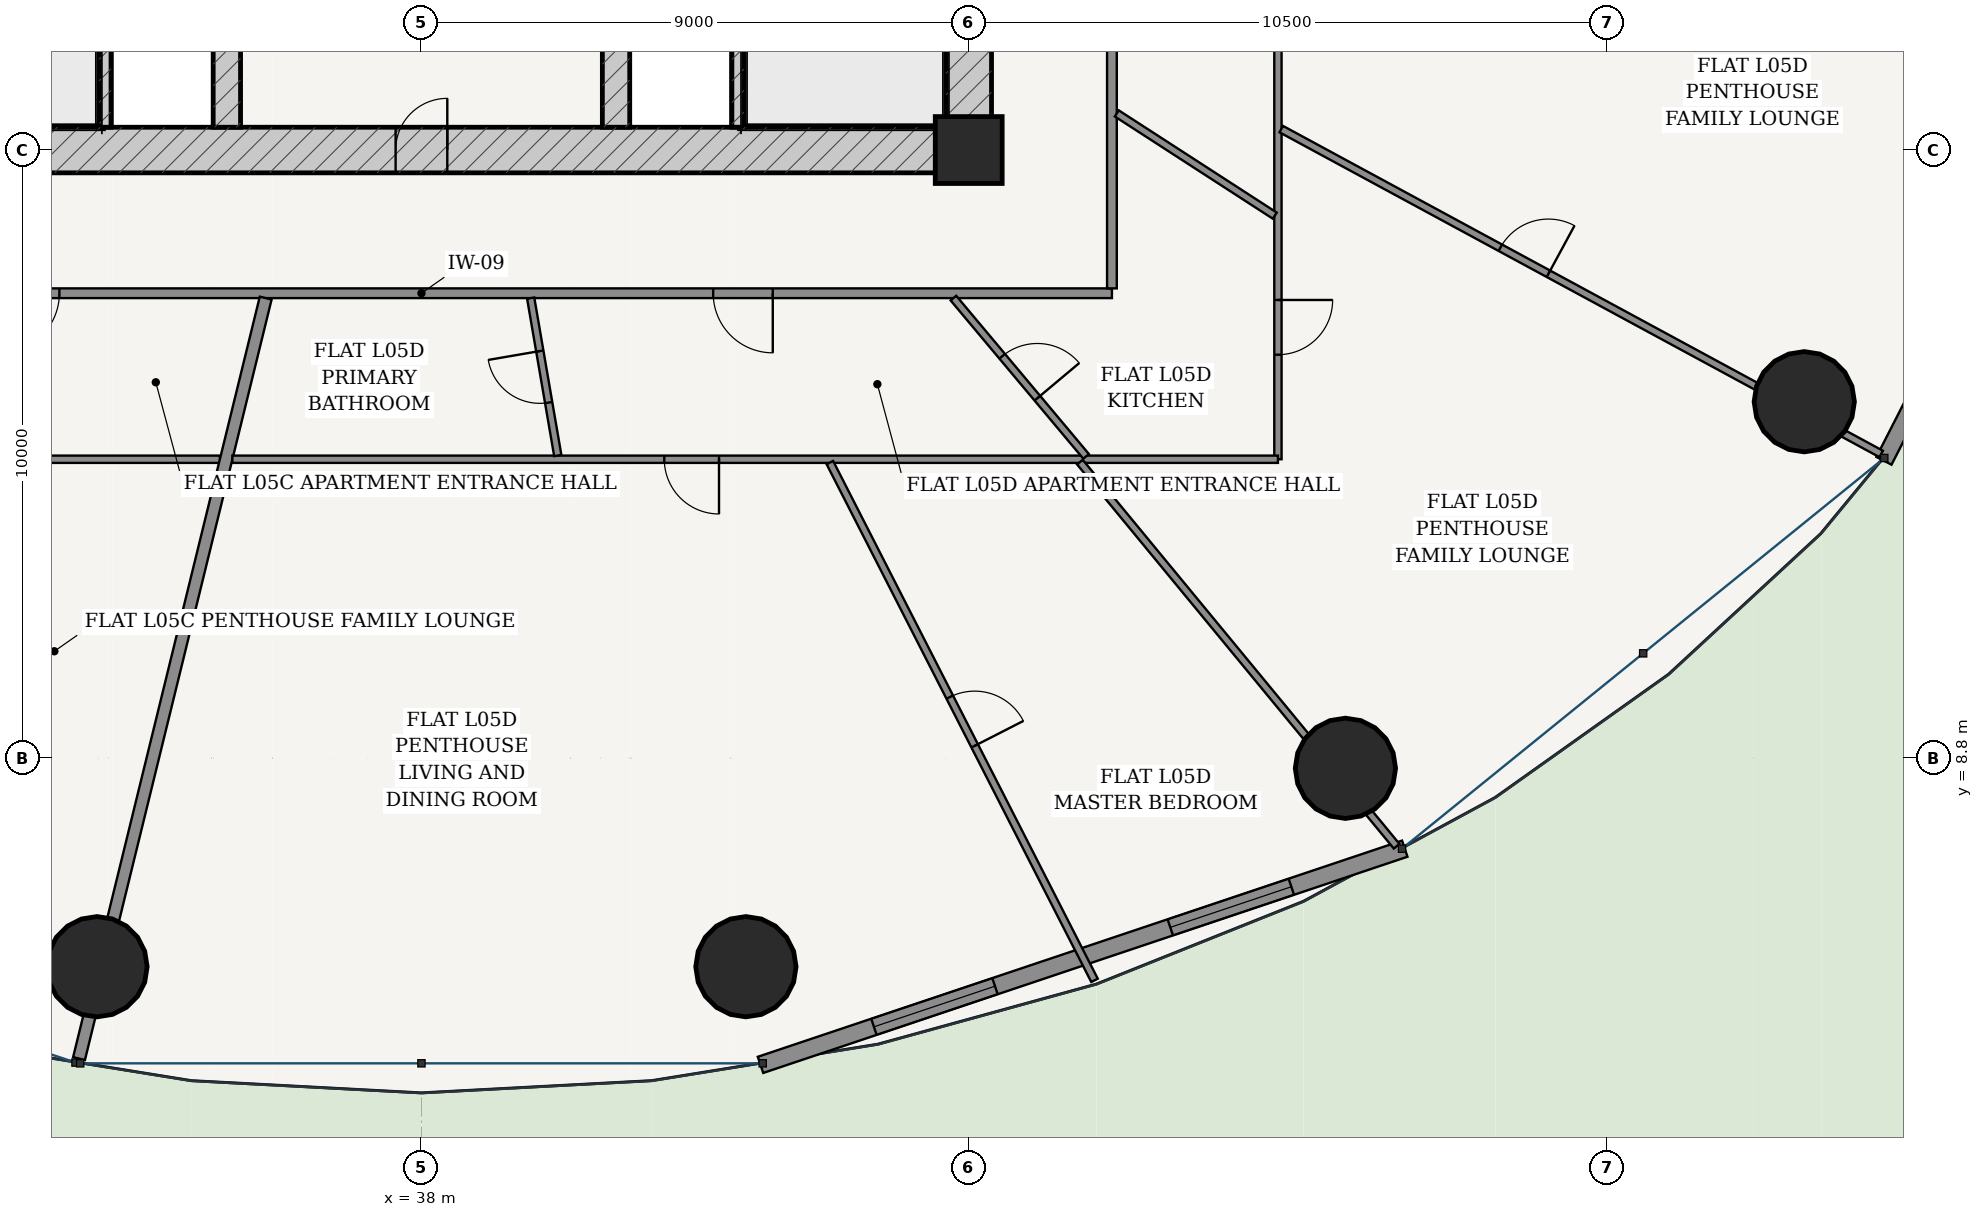
"""IFC4 building model, lengths in metres.
Left out: names, types, materials, properties, quantities, classifications, styles, units other than length and angle.
Written with IfcOpenShell. Run it as: python <this file> out.ifc"""

import sys

from ifc_helpers import new_model, si_unit, direction, frame, frame_2d, origin, origin_2d, place, context, subcontext, project, spatial, rectangle, hollow_circle, extrude, source, transform, mapped, element, fill, save


model = new_model("IFC4")
c1 = context("Model", 3, precision=1e-05, world=origin(), true_north=direction((-0.2419218956, 0.970295726276)))
c2 = subcontext(c1, "Body", "Model", "MODEL_VIEW")
j1 = project(units=[si_unit("LENGTHUNIT", "METRE"), si_unit("PLANEANGLEUNIT", "RADIAN")], contexts=[c1])
p1 = place(None, origin())
s1 = spatial("IfcSite", under=j1, at=p1, CompositionType="ELEMENT")
p2 = place(p1, origin())
s2 = spatial("IfcBuilding", under=s1, at=p2, CompositionType="ELEMENT")
p3 = place(p2, frame((0.0, 0.0, 24.0)))
s3 = spatial("IfcBuildingStorey", under=s2, at=p3, CompositionType="ELEMENT", Elevation=24.0)
p4 = place(p3, frame((47.0, 18.8, 0.0), z_axis=(0.0, 0.0, 1.0), x_axis=(1.0, 0.0, 0.0)))
e1 = element("IfcColumn", 1, at=p4, inside=s3, PredefinedType="COLUMN", context=c2, shape_type="SweptSolid", body=[
    extrude(rectangle(XDim=1.1, YDim=1.1, at=origin_2d()), origin(), (0.0, 0.0, 1.0), 3.6),
])
p5 = place(p3, frame((28.625, 18.8, 0.0), z_axis=(0.0, 0.0, 1.0), x_axis=(1.0, 0.0, 0.0)))
e2 = element("IfcWall", 2, at=p5, inside=s3, PredefinedType="SHEAR", context=c2, shape_type="SweptSolid", body=[
    extrude(rectangle(XDim=18.75, YDim=0.75, at=frame_2d((9.375, 0.0))), origin(), (0.0, 0.0, 1.0), 3.32),
])
p6 = place(p5, frame((8.95, 0.0, 0.0)))
e3 = element("IfcOpeningElement", 3, at=p6, cuts=e2, PredefinedType="OPENING", context=c2, shape_type="SweptSolid", body=[
    extrude(rectangle(XDim=0.85, YDim=2.1, at=frame_2d((0.425, 1.05))), frame((0.0, 0.385, 0.0), z_axis=(0.0, -1.0, 0.0), x_axis=(1.0, 0.0, 0.0)), (0.0, 0.0, 1.0), 0.77),
])
p7 = place(p3, frame((47.0, 19.175, 0.0), z_axis=(0.0, 0.0, 1.0), x_axis=(0.0, 1.0, 0.0)))
e4 = element("IfcWall", 4, at=p7, inside=s3, PredefinedType="SHEAR", context=c2, shape_type="SweptSolid", body=[
    extrude(rectangle(XDim=15.25, YDim=0.75, at=frame_2d((7.625, 0.0))), origin(), (0.0, 0.0, 1.0), 3.32),
])
p8 = place(p7, frame((9.875, 0.0, 0.0)))
e5 = element("IfcOpeningElement", 5, at=p8, cuts=e4, PredefinedType="OPENING", context=c2, shape_type="SweptSolid", body=[
    extrude(rectangle(XDim=1.5, YDim=2.2, at=frame_2d((0.75, 1.1))), frame((0.0, 0.385, 0.0), z_axis=(0.0, -1.0, 0.0), x_axis=(1.0, 0.0, 0.0)), (0.0, 0.0, 1.0), 0.77),
])
for number, where, z_axis, x_axis in (
    (6, (32.795, 19.175, 0.0), (0.0, 0.0, 1.0), (0.0, 1.0, 0.0)),
    (7, (43.205, 19.175, 0.0), (0.0, 0.0, 1.0), (0.0, 1.0, 0.0)),
):
    element("IfcWall", number, at=place(p3, frame(where, z_axis=z_axis, x_axis=x_axis)), inside=s3, PredefinedType="SOLIDWALL", context=c2, shape_type="SweptSolid", body=[
        extrude(rectangle(XDim=7.375, YDim=0.2, at=frame_2d((3.688, 0.0))), origin(), (0.0, 0.0, 1.0), 3.32),
    ])
p9 = place(p3, frame((34.8, 19.175, 0.0), z_axis=(0.0, 0.0, 1.0), x_axis=(0.0, 1.0, 0.0)))
e8 = element("IfcWall", 8, at=p9, inside=s3, PredefinedType="SHEAR", context=c2, shape_type="SweptSolid", body=[
    extrude(rectangle(XDim=15.25, YDim=0.45, at=frame_2d((7.625, 0.0))), origin(), (0.0, 0.0, 1.0), 3.32),
])
p10 = place(p9, frame((7.8, 0.0, 0.0)))
e9 = element("IfcOpeningElement", 9, at=p10, cuts=e8, PredefinedType="OPENING", context=c2, shape_type="SweptSolid", body=[
    extrude(rectangle(XDim=1.05, YDim=2.15, at=frame_2d((0.525, 1.075))), frame((0.0, 0.235, 0.0), z_axis=(0.0, -1.0, 0.0), x_axis=(1.0, 0.0, 0.0)), (0.0, 0.0, 1.0), 0.47),
])
p11 = place(p3, frame((41.2, 19.175, 0.0), z_axis=(0.0, 0.0, 1.0), x_axis=(0.0, 1.0, 0.0)))
e10 = element("IfcWall", 10, at=p11, inside=s3, PredefinedType="SHEAR", context=c2, shape_type="SweptSolid", body=[
    extrude(rectangle(XDim=15.25, YDim=0.45, at=frame_2d((7.625, 0.0))), origin(), (0.0, 0.0, 1.0), 3.32),
])
p12 = place(p11, frame((7.8, 0.0, 0.0)))
e11 = element("IfcOpeningElement", 11, at=p12, cuts=e10, PredefinedType="OPENING", context=c2, shape_type="SweptSolid", body=[
    extrude(rectangle(XDim=1.05, YDim=2.15, at=frame_2d((0.525, 1.075))), frame((0.0, 0.235, 0.0), z_axis=(0.0, -1.0, 0.0), x_axis=(1.0, 0.0, 0.0)), (0.0, 0.0, 1.0), 0.47),
])
for number, where, z_axis, x_axis in (
    (12, (32.664, 5.37, 0.0), (0.0, 0.0, 1.0), (1.0, 0.0, 0.0)),
    (13, (43.336, 5.37, 0.0), (0.0, 0.0, 1.0), (1.0, 0.0, 0.0)),
    (14, (53.195, 8.632, 0.0), (0.0, 0.0, 1.0), (1.0, 0.0, 0.0)),
    (15, (60.741, 14.661, 0.0), (0.0, 0.0, 1.0), (1.0, 0.0, 0.0)),
):
    element("IfcColumn", number, at=place(p3, frame(where, z_axis=z_axis, x_axis=x_axis)), inside=s3, PredefinedType="COLUMN", context=c2, shape_type="SweptSolid", body=[
        extrude(hollow_circle(Radius=0.825, WallThickness=0.05, at=origin_2d()), origin(), (0.0, 0.0, 1.0), 3.6),
    ])
p13 = place(p3, frame((43.576, 3.756, 0.0), z_axis=(0.0, 0.0, 1.0), x_axis=(0.948047847546, 0.31812777113, 0.0)))
e16 = element("IfcWall", 16, at=p13, inside=s3, PredefinedType="SOLIDWALL", context=c2, shape_type="SweptSolid", body=[
    extrude(rectangle(XDim=11.175, YDim=0.28, at=frame_2d((5.588, 0.0))), origin(), (0.0, 0.0, 1.0), 3.32),
])
p14 = place(p13, frame((1.967, 0.0, 0.85)))
e17 = element("IfcOpeningElement", 17, at=p14, cuts=e16, PredefinedType="OPENING", context=c2, shape_type="SweptSolid", body=[
    extrude(rectangle(XDim=2.1, YDim=1.95, at=frame_2d((1.05, 0.975))), frame((0.0, 0.15, 0.0), z_axis=(0.0, -1.0, 0.0), x_axis=(1.0, 0.0, 0.0)), (0.0, 0.0, 1.0), 0.3),
])
p15 = place(p13, frame((7.108, 0.0, 0.85)))
e18 = element("IfcOpeningElement", 18, at=p15, cuts=e16, PredefinedType="OPENING", context=c2, shape_type="SweptSolid", body=[
    extrude(rectangle(XDim=2.1, YDim=1.95, at=frame_2d((1.05, 0.975))), frame((0.0, 0.15, 0.0), z_axis=(0.0, -1.0, 0.0), x_axis=(1.0, 0.0, 0.0)), (0.0, 0.0, 1.0), 0.3),
])
p16 = place(p3, frame((62.051, 13.689, 0.0), z_axis=(0.0, 0.0, 1.0), x_axis=(0.455220575541, 0.890378698984, 0.0)))
e19 = element("IfcWall", 19, at=p16, inside=s3, PredefinedType="SOLIDWALL", context=c2, shape_type="SweptSolid", body=[
    extrude(rectangle(XDim=9.662, YDim=0.28, at=frame_2d((4.831, 0.0))), origin(), (0.0, 0.0, 1.0), 3.32),
])
p17 = place(p16, frame((4.156, 0.0, 0.0)))
e20 = element("IfcOpeningElement", 20, at=p17, cuts=e19, PredefinedType="OPENING", context=c2, shape_type="SweptSolid", body=[
    extrude(rectangle(XDim=1.35, YDim=2.2, at=frame_2d((0.675, 1.1))), frame((0.0, 0.15, 0.0), z_axis=(0.0, -1.0, 0.0), x_axis=(1.0, 0.0, 0.0)), (0.0, 0.0, 1.0), 0.3),
])
p18 = place(p3, frame((26.645, 16.445, 0.0), z_axis=(0.0, 0.0, 1.0), x_axis=(1.0, 0.0, 0.0)))
e21 = element("IfcWall", 21, at=p18, inside=s3, PredefinedType="PARTITIONING", context=c2, shape_type="SweptSolid", body=[
    extrude(rectangle(XDim=22.71, YDim=0.16, at=frame_2d((11.355, 0.0))), origin(), (0.0, 0.0, 1.0), 2.688),
])
p19 = place(p18, frame((4.421, 0.0, 0.0)))
e22 = element("IfcOpeningElement", 22, at=p19, cuts=e21, PredefinedType="OPENING", context=c2, shape_type="SweptSolid", body=[
    extrude(rectangle(XDim=0.98, YDim=2.2, at=frame_2d((0.49, 1.1))), frame((0.0, 0.09, 0.0), z_axis=(0.0, -1.0, 0.0), x_axis=(1.0, 0.0, 0.0)), (0.0, 0.0, 1.0), 0.18),
])
p20 = place(p18, frame((16.153, 0.0, 0.0)))
e23 = element("IfcOpeningElement", 23, at=p20, cuts=e21, PredefinedType="OPENING", context=c2, shape_type="SweptSolid", body=[
    extrude(rectangle(XDim=0.98, YDim=2.2, at=frame_2d((0.49, 1.1))), frame((0.0, 0.09, 0.0), z_axis=(0.0, -1.0, 0.0), x_axis=(1.0, 0.0, 0.0)), (0.0, 0.0, 1.0), 0.18),
])
p21 = place(p3, frame((49.355, 16.525, 0.0), z_axis=(0.0, 0.0, 1.0), x_axis=(0.0, 1.0, 0.0)))
e24 = element("IfcWall", 24, at=p21, inside=s3, PredefinedType="PARTITIONING", context=c2, shape_type="SweptSolid", body=[
    extrude(rectangle(XDim=20.55, YDim=0.16, at=frame_2d((10.275, 0.0))), origin(), (0.0, 0.0, 1.0), 2.688),
])
p22 = place(p21, frame((15.635, 0.0, 0.0)))
e25 = element("IfcOpeningElement", 25, at=p22, cuts=e24, PredefinedType="OPENING", context=c2, shape_type="SweptSolid", body=[
    extrude(rectangle(XDim=0.98, YDim=2.2, at=frame_2d((0.49, 1.1))), frame((0.0, 0.09, 0.0), z_axis=(0.0, -1.0, 0.0), x_axis=(1.0, 0.0, 0.0)), (0.0, 0.0, 1.0), 0.18),
])
p23 = place(p3, frame((34.686, 13.715, 0.0), z_axis=(0.0, 0.0, 1.0), x_axis=(-1.0, 0.0, 0.0)))
e26 = element("IfcWall", 26, at=p23, inside=s3, PredefinedType="PARTITIONING", context=c2, shape_type="SweptSolid", body=[
    extrude(rectangle(XDim=10.771, YDim=0.12, at=frame_2d((5.385, 0.0))), origin(), (0.0, 0.0, 1.0), 2.688),
])
p24 = place(p23, frame((5.01, 0.0, 0.0)))
e27 = element("IfcOpeningElement", 27, at=p24, cuts=e26, PredefinedType="OPENING", context=c2, shape_type="SweptSolid", body=[
    extrude(rectangle(XDim=0.9, YDim=2.15, at=frame_2d((0.45, 1.075))), frame((0.0, 0.07, 0.0), z_axis=(0.0, -1.0, 0.0), x_axis=(1.0, 0.0, 0.0)), (0.0, 0.0, 1.0), 0.14),
])
p25 = place(p3, frame((35.438, 16.365, 0.0), z_axis=(0.0, 0.0, 1.0), x_axis=(-0.238380116209, -0.971171931326, 0.0)))
e28 = element("IfcWall", 28, at=p25, inside=s3, PredefinedType="PARTITIONING", context=c2, shape_type="SweptSolid", body=[
    extrude(rectangle(XDim=12.877, YDim=0.2, at=frame_2d((6.438, 0.0))), origin(), (0.0, 0.0, 1.0), 2.688),
])
p26 = place(p3, frame((52.085, 24.428, 0.0), z_axis=(0.0, 0.0, 1.0), x_axis=(0.0, -1.0, 0.0)))
e29 = element("IfcWall", 29, at=p26, inside=s3, PredefinedType="PARTITIONING", context=c2, shape_type="SweptSolid", body=[
    extrude(rectangle(XDim=10.713, YDim=0.12, at=frame_2d((5.356, 0.0))), origin(), (0.0, 0.0, 1.0), 2.688),
])
p27 = place(p26, frame((8.094, 0.0, 0.0)))
e30 = element("IfcOpeningElement", 30, at=p27, cuts=e29, PredefinedType="OPENING", context=c2, shape_type="SweptSolid", body=[
    extrude(rectangle(XDim=0.9, YDim=2.15, at=frame_2d((0.45, 1.075))), frame((0.0, 0.07, 0.0), z_axis=(0.0, -1.0, 0.0), x_axis=(1.0, 0.0, 0.0)), (0.0, 0.0, 1.0), 0.14),
])
p28 = place(p26, frame((2.354, 0.0, 0.0)))
e31 = element("IfcOpeningElement", 31, at=p28, cuts=e29, PredefinedType="OPENING", context=c2, shape_type="SweptSolid", body=[
    extrude(rectangle(XDim=0.9, YDim=2.15, at=frame_2d((0.45, 1.075))), frame((0.0, 0.07, 0.0), z_axis=(0.0, -1.0, 0.0), x_axis=(1.0, 0.0, 0.0)), (0.0, 0.0, 1.0), 0.14),
])
p29 = place(p3, frame((52.085, 13.715, 0.0), z_axis=(0.0, 0.0, 1.0), x_axis=(-1.0, 0.0, 0.0)))
e32 = element("IfcWall", 32, at=p29, inside=s3, PredefinedType="PARTITIONING", context=c2, shape_type="SweptSolid", body=[
    extrude(rectangle(XDim=17.195, YDim=0.12, at=frame_2d((8.597, 0.0))), origin(), (0.0, 0.0, 1.0), 2.688),
])
p30 = place(p29, frame((9.191, 0.0, 0.0)))
e33 = element("IfcOpeningElement", 33, at=p30, cuts=e32, PredefinedType="OPENING", context=c2, shape_type="SweptSolid", body=[
    extrude(rectangle(XDim=0.9, YDim=2.15, at=frame_2d((0.45, 1.075))), frame((0.0, 0.07, 0.0), z_axis=(0.0, -1.0, 0.0), x_axis=(1.0, 0.0, 0.0)), (0.0, 0.0, 1.0), 0.14),
])
p31 = place(p3, frame((44.717, 13.66, 0.0), z_axis=(0.0, 0.0, 1.0), x_axis=(0.455131303234, -0.890424335256, 0.0)))
e34 = element("IfcWall", 34, at=p31, inside=s3, PredefinedType="PARTITIONING", context=c2, shape_type="SweptSolid", body=[
    extrude(rectangle(XDim=9.562, YDim=0.12, at=frame_2d((4.781, 0.0))), origin(), (0.0, 0.0, 1.0), 2.762),
])
p32 = place(p31, frame((4.331, 0.0, 0.0)))
e35 = element("IfcOpeningElement", 35, at=p32, cuts=e34, PredefinedType="OPENING", context=c2, shape_type="SweptSolid", body=[
    extrude(rectangle(XDim=0.9, YDim=2.15, at=frame_2d((0.45, 1.075))), frame((0.0, 0.07, 0.0), z_axis=(0.0, -1.0, 0.0), x_axis=(1.0, 0.0, 0.0)), (0.0, 0.0, 1.0), 0.14),
])
p33 = place(p3, frame((48.829, 13.667, 0.0), z_axis=(0.0, 0.0, 1.0), x_axis=(0.636177533893, -0.771542704826, 0.0)))
e36 = element("IfcWall", 36, at=p33, inside=s3, PredefinedType="PARTITIONING", context=c2, shape_type="SweptSolid", body=[
    extrude(rectangle(XDim=8.187, YDim=0.12, at=frame_2d((4.093, 0.0))), origin(), (0.0, 0.0, 1.0), 2.688),
])
p34 = place(p3, frame((52.139, 19.144, 0.0), z_axis=(0.0, 0.0, 1.0), x_axis=(0.879372452045, -0.476134529922, 0.0)))
e37 = element("IfcWall", 37, at=p34, inside=s3, PredefinedType="PARTITIONING", context=c2, shape_type="SweptSolid", body=[
    extrude(rectangle(XDim=11.219, YDim=0.12, at=frame_2d((5.61, 0.0))), origin(), (0.0, 0.0, 1.0), 2.688),
])
p35 = place(p34, frame((4.097, 0.0, 0.0)))
e38 = element("IfcOpeningElement", 38, at=p35, cuts=e37, PredefinedType="OPENING", context=c2, shape_type="SweptSolid", body=[
    extrude(rectangle(XDim=0.9, YDim=2.15, at=frame_2d((0.45, 1.075))), frame((0.0, 0.07, 0.0), z_axis=(0.0, -1.0, 0.0), x_axis=(1.0, 0.0, 0.0)), (0.0, 0.0, 1.0), 0.14),
])
p36 = place(p3, frame((39.796, 16.365, 0.0), z_axis=(0.0, 0.0, 1.0), x_axis=(0.169611246875, -0.985511047596, 0.0)))
e39 = element("IfcWall", 39, at=p36, inside=s3, PredefinedType="PARTITIONING", context=c2, shape_type="SweptSolid", body=[
    extrude(rectangle(XDim=2.627, YDim=0.12, at=frame_2d((1.313, 0.0))), origin(), (0.0, 0.0, 1.0), 3.32),
])
p37 = place(p36, frame((0.884, 0.0, 0.0)))
e40 = element("IfcOpeningElement", 40, at=p37, cuts=e39, PredefinedType="OPENING", context=c2, shape_type="SweptSolid", body=[
    extrude(rectangle(XDim=0.86, YDim=2.15, at=frame_2d((0.43, 1.075))), frame((0.0, 0.07, 0.0), z_axis=(0.0, -1.0, 0.0), x_axis=(1.0, 0.0, 0.0)), (0.0, 0.0, 1.0), 0.14),
])
p38 = place(p3, frame((46.749, 16.365, 0.0), z_axis=(0.0, 0.0, 1.0), x_axis=(0.64245841772, -0.766320547487, 0.0)))
e41 = element("IfcWall", 41, at=p38, inside=s3, PredefinedType="PARTITIONING", context=c2, shape_type="SweptSolid", body=[
    extrude(rectangle(XDim=3.396, YDim=0.12, at=frame_2d((1.698, 0.0))), origin(), (0.0, 0.0, 1.0), 3.32),
])
p39 = place(p38, frame((1.248, 0.0, 0.0)))
e42 = element("IfcOpeningElement", 42, at=p39, cuts=e41, PredefinedType="OPENING", context=c2, shape_type="SweptSolid", body=[
    extrude(rectangle(XDim=0.9, YDim=2.15, at=frame_2d((0.45, 1.075))), frame((0.0, 0.07, 0.0), z_axis=(0.0, -1.0, 0.0), x_axis=(1.0, 0.0, 0.0)), (0.0, 0.0, 1.0), 0.14),
])
p40 = place(p3, frame((49.435, 19.402, 0.0), z_axis=(0.0, 0.0, 1.0), x_axis=(0.839582858019, -0.543231649042, 0.0)))
e43 = element("IfcWall", 43, at=p40, inside=s3, PredefinedType="PARTITIONING", context=c2, shape_type="SweptSolid", body=[
    extrude(rectangle(XDim=3.094, YDim=0.12, at=frame_2d((1.547, 0.0))), origin(), (0.0, 0.0, 1.0), 3.32),
])
m1 = source(origin(), c2, "Body", "SweptSolid", [
    extrude(rectangle(XDim=2.1, YDim=1.95, at=frame_2d((1.05, 0.975))), frame((0.0, 0.03, 0.0), z_axis=(0.0, -1.0, 0.0), x_axis=(1.0, 0.0, 0.0)), (0.0, 0.0, 1.0), 0.06),
])
p41 = place(p14, origin())
e44 = element("IfcWindow", 44, at=p41, inside=s3, PartitioningType="SINGLE_PANEL", PredefinedType="WINDOW", context=c2, shape_type="MappedRepresentation", body=[
    mapped(m1, transform((0.0, 0.0, 0.0), scale=1.0)),
])
fill(e17, e44)
p42 = place(p15, origin())
e45 = element("IfcWindow", 45, at=p42, inside=s3, PartitioningType="SINGLE_PANEL", PredefinedType="WINDOW", context=c2, shape_type="MappedRepresentation", body=[
    mapped(m1, transform((0.0, 0.0, 0.0), scale=1.0)),
])
fill(e18, e45)
m2 = source(origin(), c2, "Body", "SweptSolid", [
    extrude(rectangle(XDim=0.85, YDim=2.1, at=frame_2d((0.425, 1.05))), frame((0.0, 0.025, 0.0), z_axis=(0.0, -1.0, 0.0), x_axis=(1.0, 0.0, 0.0)), (0.0, 0.0, 1.0), 0.05),
])
p43 = place(p6, origin())
e46 = element("IfcDoor", 46, at=p43, inside=s3, OperationType="SINGLE_SWING_RIGHT", PredefinedType="DOOR", context=c2, shape_type="MappedRepresentation", body=[
    mapped(m2, transform((0.0, 0.0, 0.0), scale=1.0)),
])
fill(e3, e46)
m3 = source(origin(), c2, "Body", "SweptSolid", [
    extrude(rectangle(XDim=0.98, YDim=2.2, at=frame_2d((0.49, 1.1))), frame((0.0, 0.025, 0.0), z_axis=(0.0, -1.0, 0.0), x_axis=(1.0, 0.0, 0.0)), (0.0, 0.0, 1.0), 0.05),
])
p44 = place(p19, frame((0.98, 0.0, 0.0), z_axis=(0.0, 0.0, 1.0), x_axis=(-1.0, 0.0, 0.0)))
e47 = element("IfcDoor", 47, at=p44, inside=s3, OperationType="SINGLE_SWING_RIGHT", PredefinedType="DOOR", context=c2, shape_type="MappedRepresentation", body=[
    mapped(m3, transform((0.0, 0.0, 0.0), scale=1.0)),
])
fill(e22, e47)
p45 = place(p20, frame((0.98, 0.0, 0.0), z_axis=(0.0, 0.0, 1.0), x_axis=(-1.0, 0.0, 0.0)))
e48 = element("IfcDoor", 48, at=p45, inside=s3, OperationType="SINGLE_SWING_LEFT", PredefinedType="DOOR", context=c2, shape_type="MappedRepresentation", body=[
    mapped(m3, transform((0.0, 0.0, 0.0), scale=1.0)),
])
fill(e23, e48)
m4 = source(origin(), c2, "Body", "SweptSolid", [
    extrude(rectangle(XDim=0.86, YDim=2.15, at=frame_2d((0.43, 1.075))), frame((0.0, 0.025, 0.0), z_axis=(0.0, -1.0, 0.0), x_axis=(1.0, 0.0, 0.0)), (0.0, 0.0, 1.0), 0.05),
])
p46 = place(p37, frame((0.86, 0.0, 0.0), z_axis=(0.0, 0.0, 1.0), x_axis=(-1.0, 0.0, 0.0)))
e49 = element("IfcDoor", 49, at=p46, inside=s3, OperationType="SINGLE_SWING_RIGHT", PredefinedType="DOOR", context=c2, shape_type="MappedRepresentation", body=[
    mapped(m4, transform((0.0, 0.0, 0.0), scale=1.0)),
])
fill(e40, e49)
m5 = source(origin(), c2, "Body", "SweptSolid", [
    extrude(rectangle(XDim=0.9, YDim=2.15, at=frame_2d((0.45, 1.075))), frame((0.0, 0.025, 0.0), z_axis=(0.0, -1.0, 0.0), x_axis=(1.0, 0.0, 0.0)), (0.0, 0.0, 1.0), 0.05),
])
p47 = place(p30, origin())
e50 = element("IfcDoor", 50, at=p47, inside=s3, OperationType="SINGLE_SWING_LEFT", PredefinedType="DOOR", context=c2, shape_type="MappedRepresentation", body=[
    mapped(m5, transform((0.0, 0.0, 0.0), scale=1.0)),
])
fill(e33, e50)
p48 = place(p39, origin())
e51 = element("IfcDoor", 51, at=p48, inside=s3, OperationType="SINGLE_SWING_RIGHT", PredefinedType="DOOR", context=c2, shape_type="MappedRepresentation", body=[
    mapped(m5, transform((0.0, 0.0, 0.0), scale=1.0)),
])
fill(e42, e51)
p49 = place(p27, origin())
e52 = element("IfcDoor", 52, at=p49, inside=s3, OperationType="SINGLE_SWING_LEFT", PredefinedType="DOOR", context=c2, shape_type="MappedRepresentation", body=[
    mapped(m5, transform((0.0, 0.0, 0.0), scale=1.0)),
])
fill(e30, e52)
p50 = place(p35, origin())
e53 = element("IfcDoor", 53, at=p50, inside=s3, OperationType="SINGLE_SWING_RIGHT", PredefinedType="DOOR", context=c2, shape_type="MappedRepresentation", body=[
    mapped(m5, transform((0.0, 0.0, 0.0), scale=1.0)),
])
fill(e38, e53)
p51 = place(p32, origin())
e54 = element("IfcDoor", 54, at=p51, inside=s3, OperationType="SINGLE_SWING_RIGHT", PredefinedType="DOOR", context=c2, shape_type="MappedRepresentation", body=[
    mapped(m5, transform((0.0, 0.0, 0.0), scale=1.0)),
])
fill(e35, e54)
save(model, sys.argv[1])
